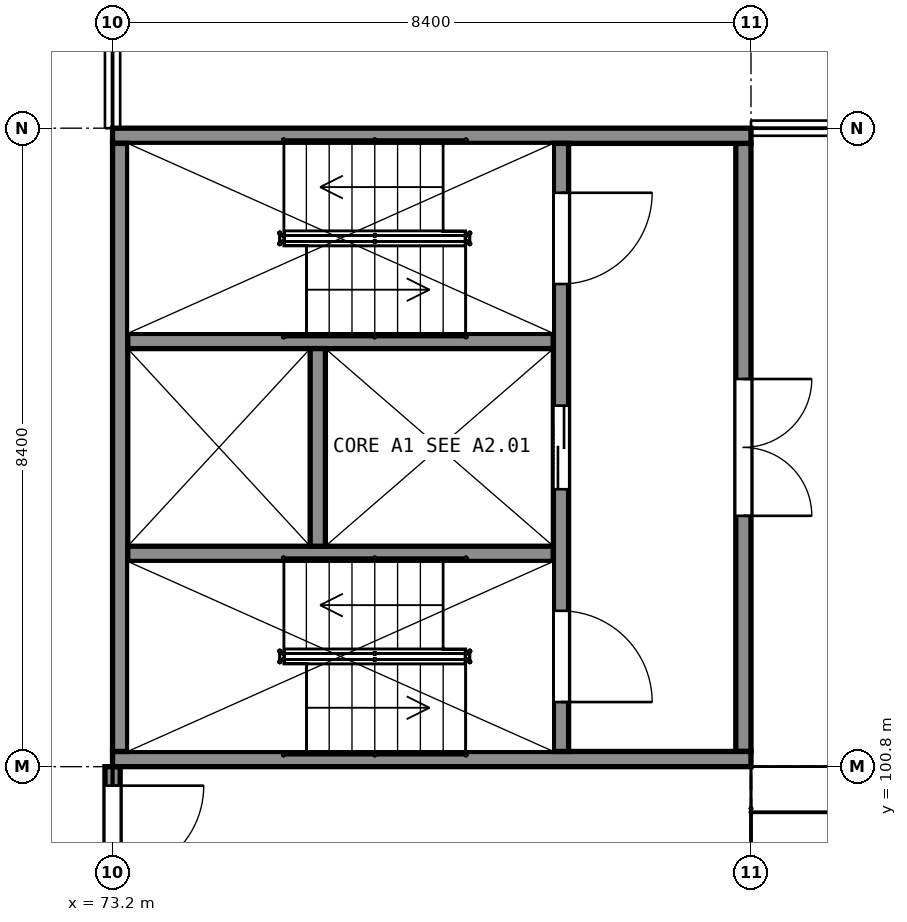
"""IFC4 building model, lengths in metres.
Left out: names, types, materials, properties, quantities, classifications, styles, units other than length and angle.
Written with IfcOpenShell. Run it as: python <this file> out.ifc"""

import sys

from ifc_helpers import new_model, si_unit, direction, frame, frame_2d, origin, place, context, subcontext, project, spatial, rectangle, extrude, element, fill, save


model = new_model("IFC4")
c1 = context("Model", 3, precision=1e-05, world=origin(), true_north=direction((0.0, 1.0)))
c2 = subcontext(c1, "Body", "Model", "MODEL_VIEW")
j1 = project(units=[si_unit("LENGTHUNIT", "METRE"), si_unit("PLANEANGLEUNIT", "RADIAN")], contexts=[c1])
p1 = place(None, origin())
s1 = spatial("IfcSite", under=j1, at=p1, CompositionType="ELEMENT")
p2 = place(p1, origin())
s2 = spatial("IfcBuilding", under=s1, at=p2, CompositionType="ELEMENT")
p3 = place(p2, frame((0.0, 0.0, 10.5)))
s3 = spatial("IfcBuildingStorey", under=s2, at=p3, CompositionType="ELEMENT", Elevation=10.5)
for number, where, z_axis, x_axis in (
    (1, (73.2, 100.9, 0.0), (0.0, 0.0, 1.0), (1.0, 0.0, 0.0)),
    (2, (73.2, 109.1, 0.0), (0.0, 0.0, 1.0), (1.0, 0.0, 0.0)),
):
    element("IfcWall", number, at=place(p3, frame(where, z_axis=z_axis, x_axis=x_axis)), inside=s3, PredefinedType="SHEAR", context=c2, shape_type="SweptSolid", body=[
        extrude(rectangle(XDim=8.4, YDim=0.2, at=frame_2d((4.2, 0.0))), origin(), (0.0, 0.0, 1.0), 9.5),
    ])
p4 = place(p3, frame((73.3, 101.0, 0.0), z_axis=(0.0, 0.0, 1.0), x_axis=(0.0, 1.0, 0.0)))
e3 = element("IfcWall", 3, at=p4, inside=s3, PredefinedType="SHEAR", context=c2, shape_type="SweptSolid", body=[
    extrude(rectangle(XDim=8.0, YDim=0.2, at=frame_2d((4.0, 0.0))), origin(), (0.0, 0.0, 1.0), 9.5),
])
p5 = place(p3, frame((81.5, 101.0, 0.0), z_axis=(0.0, 0.0, 1.0), x_axis=(0.0, 1.0, 0.0)))
e4 = element("IfcWall", 4, at=p5, inside=s3, PredefinedType="SHEAR", context=c2, shape_type="SweptSolid", body=[
    extrude(rectangle(XDim=8.0, YDim=0.2, at=frame_2d((4.0, 0.0))), origin(), (0.0, 0.0, 1.0), 9.5),
])
p6 = place(p5, frame((3.1, 0.0, 0.0)))
e5 = element("IfcOpeningElement", 5, at=p6, cuts=e4, PredefinedType="OPENING", context=c2, shape_type="SweptSolid", body=[
    extrude(rectangle(XDim=1.8, YDim=2.1, at=frame_2d((0.9, 1.05))), frame((0.0, 0.11, 0.0), z_axis=(0.0, -1.0, 0.0), x_axis=(1.0, 0.0, 0.0)), (0.0, 0.0, 1.0), 0.22),
])
p7 = place(p3, frame((79.1, 101.0, 0.0), z_axis=(0.0, 0.0, 1.0), x_axis=(0.0, 1.0, 0.0)))
e6 = element("IfcWall", 6, at=p7, inside=s3, PredefinedType="SHEAR", context=c2, shape_type="SweptSolid", body=[
    extrude(rectangle(XDim=8.0, YDim=0.2, at=frame_2d((4.0, 0.0))), origin(), (0.0, 0.0, 1.0), 9.5),
])
p8 = place(p7, frame((0.65, 0.0, 0.0)))
e7 = element("IfcOpeningElement", 7, at=p8, cuts=e6, PredefinedType="OPENING", context=c2, shape_type="SweptSolid", body=[
    extrude(rectangle(XDim=1.2, YDim=2.1, at=frame_2d((0.6, 1.05))), frame((0.0, 0.11, 0.0), z_axis=(0.0, -1.0, 0.0), x_axis=(1.0, 0.0, 0.0)), (0.0, 0.0, 1.0), 0.22),
])
p9 = place(p7, frame((6.15, 0.0, 0.0)))
e8 = element("IfcOpeningElement", 8, at=p9, cuts=e6, PredefinedType="OPENING", context=c2, shape_type="SweptSolid", body=[
    extrude(rectangle(XDim=1.2, YDim=2.1, at=frame_2d((0.6, 1.05))), frame((0.0, 0.11, 0.0), z_axis=(0.0, -1.0, 0.0), x_axis=(1.0, 0.0, 0.0)), (0.0, 0.0, 1.0), 0.22),
])
p10 = place(p7, frame((3.45, 0.0, 0.0)))
e9 = element("IfcOpeningElement", 9, at=p10, cuts=e6, PredefinedType="OPENING", context=c2, shape_type="SweptSolid", body=[
    extrude(rectangle(XDim=1.1, YDim=2.1, at=frame_2d((0.55, 1.05))), frame((0.0, 0.11, 0.0), z_axis=(0.0, -1.0, 0.0), x_axis=(1.0, 0.0, 0.0)), (0.0, 0.0, 1.0), 0.22),
])
for number, where, z_axis, x_axis in (
    (10, (73.4, 103.6, 0.0), (0.0, 0.0, 1.0), (1.0, 0.0, 0.0)),
    (11, (73.4, 106.4, 0.0), (0.0, 0.0, 1.0), (1.0, 0.0, 0.0)),
):
    element("IfcWall", number, at=place(p3, frame(where, z_axis=z_axis, x_axis=x_axis)), inside=s3, PredefinedType="SHEAR", context=c2, shape_type="SweptSolid", body=[
        extrude(rectangle(XDim=5.6, YDim=0.2, at=frame_2d((2.8, 0.0))), origin(), (0.0, 0.0, 1.0), 9.5),
    ])
p11 = place(p3, frame((75.9, 103.7, 0.0), z_axis=(0.0, 0.0, 1.0), x_axis=(0.0, 1.0, 0.0)))
e12 = element("IfcWall", 12, at=p11, inside=s3, PredefinedType="SHEAR", context=c2, shape_type="SweptSolid", body=[
    extrude(rectangle(XDim=2.6, YDim=0.2, at=frame_2d((1.3, 0.0))), origin(), (0.0, 0.0, 1.0), 9.5),
])
p12 = place(p3, frame((73.2, 92.4, 0.0), z_axis=(0.0, 0.0, 1.0), x_axis=(0.0, 1.0, 0.0)))
e13 = element("IfcWall", 13, at=p12, inside=s3, PredefinedType="PARTITIONING", context=c2, shape_type="SweptSolid", body=[
    extrude(rectangle(XDim=8.4, YDim=0.2, at=frame_2d((4.2, 0.0))), origin(), (0.0, 0.0, 1.0), 7.96),
])
p13 = place(p12, frame((5.75, 0.0, 0.0)))
e14 = element("IfcOpeningElement", 14, at=p13, cuts=e13, PredefinedType="OPENING", context=c2, shape_type="SweptSolid", body=[
    extrude(rectangle(XDim=2.4, YDim=2.4, at=frame_2d((1.2, 1.2))), frame((0.0, 0.11, 0.0), z_axis=(0.0, -1.0, 0.0), x_axis=(1.0, 0.0, 0.0)), (0.0, 0.0, 1.0), 0.22),
])
p14 = place(p13, origin())
e15 = element("IfcDoor", 15, at=p14, inside=s3, OperationType="DOUBLE_DOOR_SINGLE_SWING", PredefinedType="DOOR", context=c2, shape_type="SweptSolid", body=[
    extrude(rectangle(XDim=2.4, YDim=2.4, at=frame_2d((1.2, 1.2))), frame((0.0, 0.025, 0.0), z_axis=(0.0, -1.0, 0.0), x_axis=(1.0, 0.0, 0.0)), (0.0, 0.0, 1.0), 0.05),
])
fill(e14, e15)
p15 = place(p6, origin())
e16 = element("IfcDoor", 16, at=p15, inside=s3, OperationType="DOUBLE_DOOR_SINGLE_SWING", PredefinedType="DOOR", context=c2, shape_type="SweptSolid", body=[
    extrude(rectangle(XDim=1.8, YDim=2.1, at=frame_2d((0.9, 1.05))), frame((0.0, 0.025, 0.0), z_axis=(0.0, -1.0, 0.0), x_axis=(1.0, 0.0, 0.0)), (0.0, 0.0, 1.0), 0.05),
])
fill(e5, e16)
p16 = place(p8, origin())
e17 = element("IfcDoor", 17, at=p16, inside=s3, OperationType="SINGLE_SWING_LEFT", PredefinedType="DOOR", context=c2, shape_type="SweptSolid", body=[
    extrude(rectangle(XDim=1.2, YDim=2.1, at=frame_2d((0.6, 1.05))), frame((0.0, 0.025, 0.0), z_axis=(0.0, -1.0, 0.0), x_axis=(1.0, 0.0, 0.0)), (0.0, 0.0, 1.0), 0.05),
])
fill(e7, e17)
p17 = place(p9, origin())
e18 = element("IfcDoor", 18, at=p17, inside=s3, OperationType="SINGLE_SWING_RIGHT", PredefinedType="DOOR", context=c2, shape_type="SweptSolid", body=[
    extrude(rectangle(XDim=1.2, YDim=2.1, at=frame_2d((0.6, 1.05))), frame((0.0, 0.025, 0.0), z_axis=(0.0, -1.0, 0.0), x_axis=(1.0, 0.0, 0.0)), (0.0, 0.0, 1.0), 0.05),
])
fill(e8, e18)
p18 = place(p10, origin())
e19 = element("IfcDoor", 19, at=p18, inside=s3, OperationType="DOUBLE_DOOR_SLIDING", PredefinedType="DOOR", context=c2, shape_type="SweptSolid", body=[
    extrude(rectangle(XDim=1.1, YDim=2.1, at=frame_2d((0.55, 1.05))), frame((0.0, 0.025, 0.0), z_axis=(0.0, -1.0, 0.0), x_axis=(1.0, 0.0, 0.0)), (0.0, 0.0, 1.0), 0.05),
])
fill(e9, e19)
save(model, sys.argv[1])
